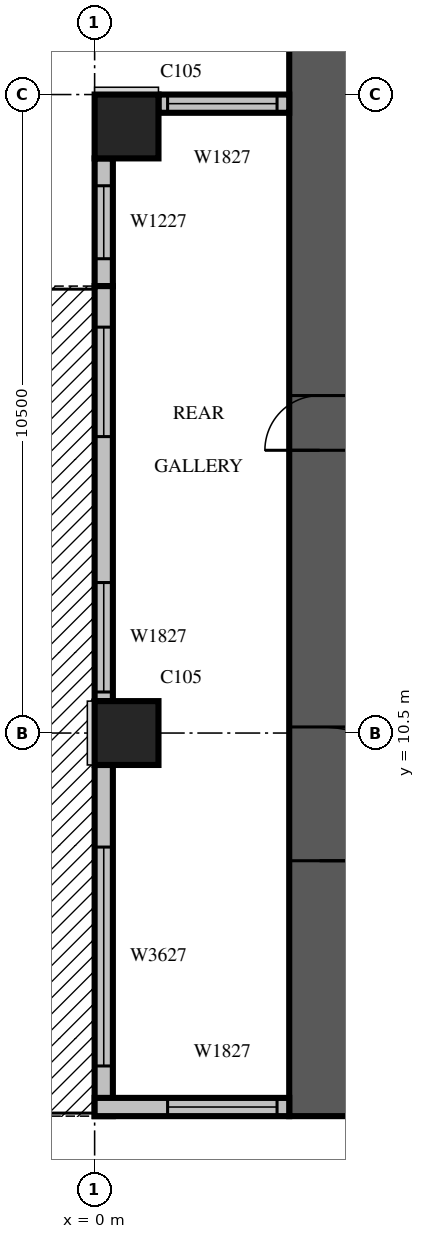
"""IFC4 building model, lengths in metres.
Left out: names, types, materials, properties, quantities, classifications, styles, units other than length and angle.
Written with IfcOpenShell. Run it as: python <this file> out.ifc"""

import sys

from ifc_helpers import new_model, si_unit, direction, frame, frame_2d, origin, origin_2d, place, context, subcontext, project, spatial, rectangle, extrude, source, transform, mapped, element, fill, save


model = new_model("IFC4")
c1 = context("Model", 3, precision=1e-05, world=origin(), true_north=direction((0.0, 1.0)))
c2 = subcontext(c1, "Body", "Model", "MODEL_VIEW")
j1 = project(units=[si_unit("LENGTHUNIT", "METRE"), si_unit("PLANEANGLEUNIT", "RADIAN")], contexts=[c1])
p1 = place(None, origin())
s1 = spatial("IfcSite", under=j1, at=p1, CompositionType="ELEMENT")
p2 = place(p1, origin())
s2 = spatial("IfcBuilding", under=s1, at=p2, CompositionType="ELEMENT")
p3 = place(p2, frame((0.0, 0.0, 158.1)))
s3 = spatial("IfcBuildingStorey", under=s2, at=p3, CompositionType="ELEMENT", Elevation=158.1)
m1 = source(origin(), c2, "Body", "SweptSolid", [
    extrude(rectangle(XDim=1.05, YDim=1.05, at=origin_2d()), origin(), (0.0, 0.0, 1.0), 4.2),
])
for number, where, z_axis, x_axis in (
    (1, (0.525, 10.5, 0.0), (0.0, 0.0, 1.0), (1.0, 0.0, 0.0)),
    (2, (0.525, 20.475, 0.0), (0.0, 0.0, 1.0), (1.0, 0.0, 0.0)),
):
    element("IfcColumn", number, at=place(p3, frame(where, z_axis=z_axis, x_axis=x_axis)), inside=s3, PredefinedType="COLUMN", context=c2, shape_type="MappedRepresentation", body=[
        mapped(m1, transform((0.0, 0.0, 0.0), scale=1.0)),
    ])
m2 = source(origin(), c2, "Body", "SweptSolid", [
    extrude(rectangle(XDim=17.8, YDim=1.0, at=frame_2d((8.9, 0.0))), origin(), (0.0, 0.0, 1.0), 4.2),
])
p4 = place(p3, frame((3.7, 4.2, 0.0), z_axis=(0.0, 0.0, 1.0), x_axis=(0.0, 1.0, 0.0)))
e3 = element("IfcWall", 3, at=p4, inside=s3, PredefinedType="SHEAR", context=c2, shape_type="MappedRepresentation", body=[
    mapped(m2, transform((0.0, 0.0, 0.0), scale=1.0)),
])
m3 = source(origin(), c2, "Body", "SweptSolid", [
    extrude(rectangle(XDim=2.2, YDim=2.1, at=frame_2d((1.1, 1.05))), frame((0.0, 0.51, 0.0), z_axis=(0.0, -1.0, 0.0), x_axis=(1.0, 0.0, 0.0)), (0.0, 0.0, 1.0), 1.02),
])
p5 = place(p4, frame((4.2, 0.0, 0.0)))
e4 = element("IfcOpeningElement", 4, at=p5, cuts=e3, PredefinedType="OPENING", context=c2, shape_type="MappedRepresentation", body=[
    mapped(m3, transform((0.0, 0.0, 0.0), scale=1.0)),
])
m4 = source(origin(), c2, "Body", "SweptSolid", [
    extrude(rectangle(XDim=0.9, YDim=2.1, at=frame_2d((0.45, 1.05))), frame((0.0, 0.51, 0.0), z_axis=(0.0, -1.0, 0.0), x_axis=(1.0, 0.0, 0.0)), (0.0, 0.0, 1.0), 1.02),
])
p6 = place(p4, frame((10.95, 0.0, 0.0)))
e5 = element("IfcOpeningElement", 5, at=p6, cuts=e3, PredefinedType="OPENING", context=c2, shape_type="MappedRepresentation", body=[
    mapped(m4, transform((0.0, 0.0, 0.0), scale=1.0)),
])
m5 = source(origin(), c2, "Body", "SweptSolid", [
    extrude(rectangle(XDim=2.15, YDim=0.3, at=frame_2d((1.075, 0.0))), origin(), (0.0, 0.0, 1.0), 3.8),
])
p7 = place(p3, frame((3.2, 20.85, 0.0), z_axis=(0.0, 0.0, 1.0), x_axis=(-1.0, 0.0, 0.0)))
e6 = element("IfcWall", 6, at=p7, inside=s3, PredefinedType="STANDARD", context=c2, shape_type="MappedRepresentation", body=[
    mapped(m5, transform((0.0, 0.0, 0.0), scale=1.0)),
])
m6 = source(origin(), c2, "Body", "SweptSolid", [
    extrude(rectangle(XDim=1.8, YDim=2.7, at=frame_2d((0.9, 1.35))), frame((0.0, 0.16, 0.0), z_axis=(0.0, -1.0, 0.0), x_axis=(1.0, 0.0, 0.0)), (0.0, 0.0, 1.0), 0.32),
])
p8 = place(p7, frame((0.2, 0.0, 0.6)))
e7 = element("IfcOpeningElement", 7, at=p8, cuts=e6, PredefinedType="OPENING", context=c2, shape_type="MappedRepresentation", body=[
    mapped(m6, transform((0.0, 0.0, 0.0), scale=1.0)),
])
m7 = source(origin(), c2, "Body", "SweptSolid", [
    extrude(rectangle(XDim=2.1, YDim=0.3, at=frame_2d((1.05, 0.0))), origin(), (0.0, 0.0, 1.0), 3.8),
])
p9 = place(p3, frame((0.15, 19.95, 0.0), z_axis=(0.0, 0.0, 1.0), x_axis=(0.0, -1.0, 0.0)))
e8 = element("IfcWall", 8, at=p9, inside=s3, PredefinedType="STANDARD", context=c2, shape_type="MappedRepresentation", body=[
    mapped(m7, transform((0.0, 0.0, 0.0), scale=1.0)),
])
m8 = source(origin(), c2, "Body", "SweptSolid", [
    extrude(rectangle(XDim=1.2, YDim=2.7, at=frame_2d((0.6, 1.35))), frame((0.0, 0.16, 0.0), z_axis=(0.0, -1.0, 0.0), x_axis=(1.0, 0.0, 0.0)), (0.0, 0.0, 1.0), 0.32),
])
p10 = place(p9, frame((0.45, 0.0, 0.6)))
e9 = element("IfcOpeningElement", 9, at=p10, cuts=e8, PredefinedType="OPENING", context=c2, shape_type="MappedRepresentation", body=[
    mapped(m8, transform((0.0, 0.0, 0.0), scale=1.0)),
])
m9 = source(origin(), c2, "Body", "SweptSolid", [
    extrude(rectangle(XDim=6.825, YDim=0.3, at=frame_2d((3.413, 0.0))), origin(), (0.0, 0.0, 1.0), 3.8),
])
p11 = place(p3, frame((0.15, 17.85, 0.0), z_axis=(0.0, 0.0, 1.0), x_axis=(0.0, -1.0, 0.0)))
e10 = element("IfcWall", 10, at=p11, inside=s3, PredefinedType="STANDARD", context=c2, shape_type="MappedRepresentation", body=[
    mapped(m9, transform((0.0, 0.0, 0.0), scale=1.0)),
])
m10 = source(origin(), c2, "Body", "SweptSolid", [
    extrude(rectangle(XDim=1.8, YDim=2.4, at=frame_2d((0.9, 1.2))), frame((0.0, 0.16, 0.0), z_axis=(0.0, -1.0, 0.0), x_axis=(1.0, 0.0, 0.0)), (0.0, 0.0, 1.0), 0.32),
])
p12 = place(p11, frame((0.675, 0.0, 0.0)))
e11 = element("IfcOpeningElement", 11, at=p12, cuts=e10, PredefinedType="OPENING", context=c2, shape_type="MappedRepresentation", body=[
    mapped(m10, transform((0.0, 0.0, 0.0), scale=1.0)),
])
p13 = place(p11, frame((4.875, 0.0, 0.6)))
e12 = element("IfcOpeningElement", 12, at=p13, cuts=e10, PredefinedType="OPENING", context=c2, shape_type="MappedRepresentation", body=[
    mapped(m6, transform((0.0, 0.0, 0.0), scale=1.0)),
])
m11 = source(origin(), c2, "Body", "SweptSolid", [
    extrude(rectangle(XDim=5.775, YDim=0.3, at=frame_2d((2.888, 0.0))), origin(), (0.0, 0.0, 1.0), 3.8),
])
p14 = place(p3, frame((0.15, 9.975, 0.0), z_axis=(0.0, 0.0, 1.0), x_axis=(0.0, -1.0, 0.0)))
e13 = element("IfcWall", 13, at=p14, inside=s3, PredefinedType="STANDARD", context=c2, shape_type="MappedRepresentation", body=[
    mapped(m11, transform((0.0, 0.0, 0.0), scale=1.0)),
])
m12 = source(origin(), c2, "Body", "SweptSolid", [
    extrude(rectangle(XDim=3.6, YDim=2.7, at=frame_2d((1.8, 1.35))), frame((0.0, 0.16, 0.0), z_axis=(0.0, -1.0, 0.0), x_axis=(1.0, 0.0, 0.0)), (0.0, 0.0, 1.0), 0.32),
])
p15 = place(p14, frame((1.35, 0.0, 0.6)))
e14 = element("IfcOpeningElement", 14, at=p15, cuts=e13, PredefinedType="OPENING", context=c2, shape_type="MappedRepresentation", body=[
    mapped(m12, transform((0.0, 0.0, 0.0), scale=1.0)),
])
m13 = source(origin(), c2, "Body", "SweptSolid", [
    extrude(rectangle(XDim=3.2, YDim=0.3, at=frame_2d((1.6, 0.0))), origin(), (0.0, 0.0, 1.0), 3.8),
])
p16 = place(p3, frame((0.0, 4.35, 0.0), z_axis=(0.0, 0.0, 1.0), x_axis=(1.0, 0.0, 0.0)))
e15 = element("IfcWall", 15, at=p16, inside=s3, PredefinedType="STANDARD", context=c2, shape_type="MappedRepresentation", body=[
    mapped(m13, transform((0.0, 0.0, 0.0), scale=1.0)),
])
p17 = place(p16, frame((1.2, 0.0, 0.6)))
e16 = element("IfcOpeningElement", 16, at=p17, cuts=e15, PredefinedType="OPENING", context=c2, shape_type="MappedRepresentation", body=[
    mapped(m6, transform((0.0, 0.0, 0.0), scale=1.0)),
])
m14 = source(origin(), c2, "Body", "SweptSolid", [
    extrude(rectangle(XDim=1.8, YDim=2.7, at=frame_2d((0.9, 1.35))), frame((0.0, 0.03, 0.0), z_axis=(0.0, -1.0, 0.0), x_axis=(1.0, 0.0, 0.0)), (0.0, 0.0, 1.0), 0.06),
])
p18 = place(p8, origin())
e17 = element("IfcWindow", 17, at=p18, inside=s3, PartitioningType="SINGLE_PANEL", PredefinedType="WINDOW", context=c2, shape_type="MappedRepresentation", body=[
    mapped(m14, transform((0.0, 0.0, 0.0), scale=1.0)),
])
fill(e7, e17)
m15 = source(origin(), c2, "Body", "SweptSolid", [
    extrude(rectangle(XDim=1.2, YDim=2.7, at=frame_2d((0.6, 1.35))), frame((0.0, 0.03, 0.0), z_axis=(0.0, -1.0, 0.0), x_axis=(1.0, 0.0, 0.0)), (0.0, 0.0, 1.0), 0.06),
])
p19 = place(p10, origin())
e18 = element("IfcWindow", 18, at=p19, inside=s3, PartitioningType="SINGLE_PANEL", PredefinedType="WINDOW", context=c2, shape_type="MappedRepresentation", body=[
    mapped(m15, transform((0.0, 0.0, 0.0), scale=1.0)),
])
fill(e9, e18)
m16 = source(origin(), c2, "Body", "SweptSolid", [
    extrude(rectangle(XDim=1.8, YDim=2.4, at=frame_2d((0.9, 1.2))), frame((0.0, 0.025, 0.0), z_axis=(0.0, -1.0, 0.0), x_axis=(1.0, 0.0, 0.0)), (0.0, 0.0, 1.0), 0.05),
])
p20 = place(p12, origin())
e19 = element("IfcDoor", 19, at=p20, inside=s3, OperationType="SLIDING_TO_LEFT", PredefinedType="DOOR", context=c2, shape_type="MappedRepresentation", body=[
    mapped(m16, transform((0.0, 0.0, 0.0), scale=1.0)),
])
fill(e11, e19)
p21 = place(p13, origin())
e20 = element("IfcWindow", 20, at=p21, inside=s3, PartitioningType="SINGLE_PANEL", PredefinedType="WINDOW", context=c2, shape_type="MappedRepresentation", body=[
    mapped(m14, transform((0.0, 0.0, 0.0), scale=1.0)),
])
fill(e12, e20)
m17 = source(origin(), c2, "Body", "SweptSolid", [
    extrude(rectangle(XDim=3.6, YDim=2.7, at=frame_2d((1.8, 1.35))), frame((0.0, 0.03, 0.0), z_axis=(0.0, -1.0, 0.0), x_axis=(1.0, 0.0, 0.0)), (0.0, 0.0, 1.0), 0.06),
])
p22 = place(p15, origin())
e21 = element("IfcWindow", 21, at=p22, inside=s3, PartitioningType="SINGLE_PANEL", PredefinedType="WINDOW", context=c2, shape_type="MappedRepresentation", body=[
    mapped(m17, transform((0.0, 0.0, 0.0), scale=1.0)),
])
fill(e14, e21)
p23 = place(p17, origin())
e22 = element("IfcWindow", 22, at=p23, inside=s3, PartitioningType="SINGLE_PANEL", PredefinedType="WINDOW", context=c2, shape_type="MappedRepresentation", body=[
    mapped(m14, transform((0.0, 0.0, 0.0), scale=1.0)),
])
fill(e16, e22)
m18 = source(origin(), c2, "Body", "SweptSolid", [
    extrude(rectangle(XDim=2.2, YDim=2.1, at=frame_2d((1.1, 1.05))), frame((0.0, 0.025, 0.0), z_axis=(0.0, -1.0, 0.0), x_axis=(1.0, 0.0, 0.0)), (0.0, 0.0, 1.0), 0.05),
])
p24 = place(p5, origin())
e23 = element("IfcDoor", 23, at=p24, inside=s3, OperationType="DOUBLE_DOOR_SINGLE_SWING", PredefinedType="DOOR", context=c2, shape_type="MappedRepresentation", body=[
    mapped(m18, transform((0.0, 0.0, 0.0), scale=1.0)),
])
fill(e4, e23)
m19 = source(origin(), c2, "Body", "SweptSolid", [
    extrude(rectangle(XDim=0.9, YDim=2.1, at=frame_2d((0.45, 1.05))), frame((0.0, 0.025, 0.0), z_axis=(0.0, -1.0, 0.0), x_axis=(1.0, 0.0, 0.0)), (0.0, 0.0, 1.0), 0.05),
])
p25 = place(p6, origin())
e24 = element("IfcDoor", 24, at=p25, inside=s3, OperationType="SINGLE_SWING_LEFT", PredefinedType="DOOR", context=c2, shape_type="MappedRepresentation", body=[
    mapped(m19, transform((0.0, 0.0, 0.0), scale=1.0)),
])
fill(e5, e24)
save(model, sys.argv[1])
